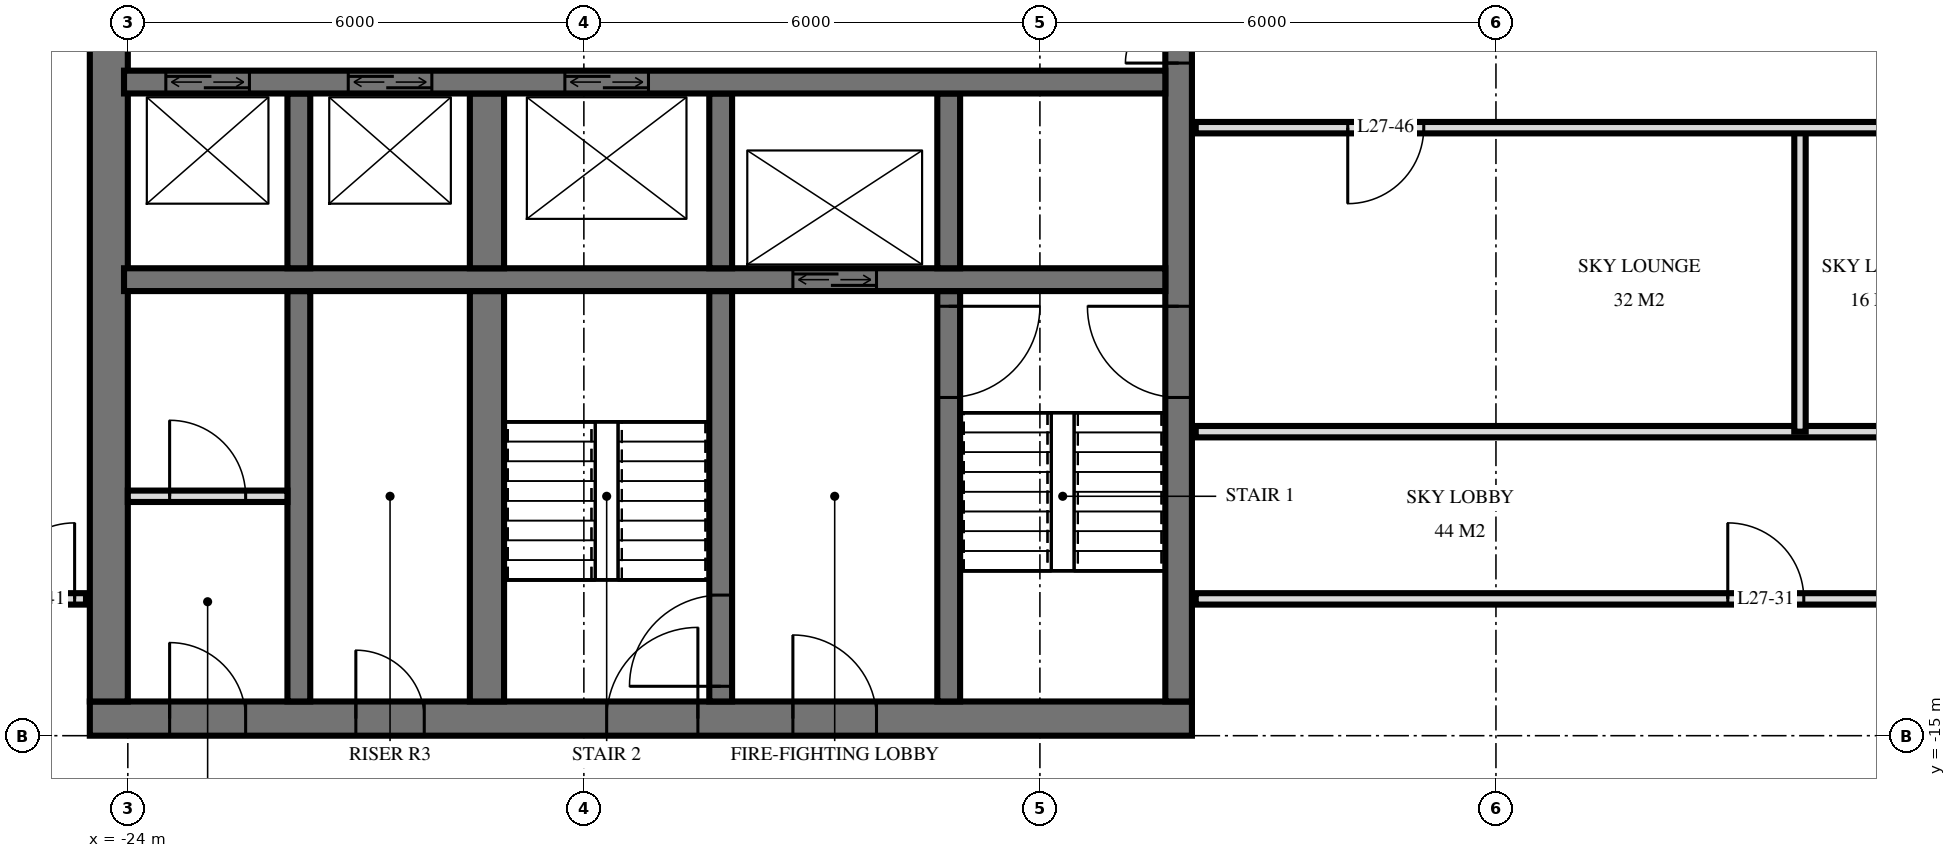
"""IFC4 building model, lengths in metres.
Left out: names, types, materials, properties, quantities, classifications, styles, units other than length and angle.
Written with IfcOpenShell. Run it as: python <this file> out.ifc"""

import sys

from ifc_helpers import new_model, si_unit, direction, frame, frame_2d, origin, place, context, subcontext, project, spatial, rectangle, extrude, element, fill, save


model = new_model("IFC4")
c1 = context("Model", 3, precision=1e-05, world=origin(), true_north=direction((0.0, 1.0)))
c2 = subcontext(c1, "Body", "Model", "MODEL_VIEW")
j1 = project(units=[si_unit("LENGTHUNIT", "METRE"), si_unit("PLANEANGLEUNIT", "RADIAN")], contexts=[c1])
p1 = place(None, origin())
s1 = spatial("IfcSite", under=j1, at=p1, CompositionType="ELEMENT")
p2 = place(p1, origin())
s2 = spatial("IfcBuilding", under=s1, at=p2, CompositionType="ELEMENT")
p3 = place(p2, frame((0.0, 0.0, 106.8)))
s3 = spatial("IfcBuildingStorey", under=s2, at=p3, CompositionType="ELEMENT", Elevation=106.8)
p4 = place(p3, frame((-24.5, -14.775, 0.0), z_axis=(0.0, 0.0, 1.0), x_axis=(1.0, 0.0, 0.0)))
e1 = element("IfcWall", 1, at=p4, inside=s3, PredefinedType="SHEAR", context=c2, shape_type="SweptSolid", body=[
    extrude(rectangle(XDim=14.5, YDim=0.45, at=frame_2d((7.25, 0.0))), origin(), (0.0, 0.0, 1.0), 6.0),
])
p5 = place(p4, frame((6.8, 0.0, 0.0)))
e2 = element("IfcOpeningElement", 2, at=p5, cuts=e1, PredefinedType="OPENING", context=c2, shape_type="SweptSolid", body=[
    extrude(rectangle(XDim=1.2, YDim=2.1, at=frame_2d((0.6, 1.05))), frame((0.0, 0.235, 0.0), z_axis=(0.0, -1.0, 0.0), x_axis=(1.0, 0.0, 0.0)), (0.0, 0.0, 1.0), 0.47),
])
p6 = place(p4, frame((9.25, 0.0, 0.0)))
e3 = element("IfcOpeningElement", 3, at=p6, cuts=e1, PredefinedType="OPENING", context=c2, shape_type="SweptSolid", body=[
    extrude(rectangle(XDim=1.1, YDim=2.1, at=frame_2d((0.55, 1.05))), frame((0.0, 0.235, 0.0), z_axis=(0.0, -1.0, 0.0), x_axis=(1.0, 0.0, 0.0)), (0.0, 0.0, 1.0), 0.47),
])
p7 = place(p4, frame((3.5, 0.0, 0.0)))
e4 = element("IfcOpeningElement", 4, at=p7, cuts=e1, PredefinedType="OPENING", context=c2, shape_type="SweptSolid", body=[
    extrude(rectangle(XDim=0.9, YDim=2.1, at=frame_2d((0.45, 1.05))), frame((0.0, 0.235, 0.0), z_axis=(0.0, -1.0, 0.0), x_axis=(1.0, 0.0, 0.0)), (0.0, 0.0, 1.0), 0.47),
])
p8 = place(p4, frame((1.05, 0.0, 0.0)))
e5 = element("IfcOpeningElement", 5, at=p8, cuts=e1, PredefinedType="OPENING", context=c2, shape_type="SweptSolid", body=[
    extrude(rectangle(XDim=1.0, YDim=2.1, at=frame_2d((0.5, 1.05))), frame((0.0, 0.235, 0.0), z_axis=(0.0, -1.0, 0.0), x_axis=(1.0, 0.0, 0.0)), (0.0, 0.0, 1.0), 0.47),
])
p9 = place(p3, frame((-10.175, -14.55, 0.0), z_axis=(0.0, 0.0, 1.0), x_axis=(0.0, 1.0, 0.0)))
e6 = element("IfcWall", 6, at=p9, inside=s3, PredefinedType="SHEAR", context=c2, shape_type="SweptSolid", body=[
    extrude(rectangle(XDim=14.1, YDim=0.35, at=frame_2d((7.05, 0.0))), origin(), (0.0, 0.0, 1.0), 6.0),
])
p10 = place(p9, frame((8.4, 0.0, 0.0)))
e7 = element("IfcOpeningElement", 7, at=p10, cuts=e6, PredefinedType="OPENING", context=c2, shape_type="SweptSolid", body=[
    extrude(rectangle(XDim=1.4, YDim=2.4, at=frame_2d((0.7, 1.2))), frame((0.0, 0.185, 0.0), z_axis=(0.0, -1.0, 0.0), x_axis=(1.0, 0.0, 0.0)), (0.0, 0.0, 1.0), 0.37),
])
p11 = place(p9, frame((10.0, 0.0, 0.0)))
e8 = element("IfcOpeningElement", 8, at=p11, cuts=e6, PredefinedType="OPENING", context=c2, shape_type="SweptSolid", body=[
    extrude(rectangle(XDim=1.4, YDim=2.4, at=frame_2d((0.7, 1.2))), frame((0.0, 0.185, 0.0), z_axis=(0.0, -1.0, 0.0), x_axis=(1.0, 0.0, 0.0)), (0.0, 0.0, 1.0), 0.37),
])
p12 = place(p9, frame((4.0, 0.0, 0.0)))
e9 = element("IfcOpeningElement", 9, at=p12, cuts=e6, PredefinedType="OPENING", context=c2, shape_type="SweptSolid", body=[
    extrude(rectangle(XDim=1.2, YDim=2.1, at=frame_2d((0.6, 1.05))), frame((0.0, 0.185, 0.0), z_axis=(0.0, -1.0, 0.0), x_axis=(1.0, 0.0, 0.0)), (0.0, 0.0, 1.0), 0.37),
])
p13 = place(p3, frame((-24.25, -14.55, 0.0), z_axis=(0.0, 0.0, 1.0), x_axis=(0.0, 1.0, 0.0)))
e10 = element("IfcWall", 10, at=p13, inside=s3, PredefinedType="SHEAR", context=c2, shape_type="SweptSolid", body=[
    extrude(rectangle(XDim=14.1, YDim=0.5, at=frame_2d((7.05, 0.0))), origin(), (0.0, 0.0, 1.0), 6.0),
])
p14 = place(p3, frame((-24.05, -6.4, 0.0), z_axis=(0.0, 0.0, 1.0), x_axis=(1.0, 0.0, 0.0)))
e11 = element("IfcWall", 11, at=p14, inside=s3, PredefinedType="SHEAR", context=c2, shape_type="SweptSolid", body=[
    extrude(rectangle(XDim=13.7, YDim=0.3, at=frame_2d((6.85, 0.0))), origin(), (0.0, 0.0, 1.0), 6.0),
])
p15 = place(p14, frame((2.95, 0.0, 0.0)))
e12 = element("IfcOpeningElement", 12, at=p15, cuts=e11, PredefinedType="OPENING", context=c2, shape_type="SweptSolid", body=[
    extrude(rectangle(XDim=1.1, YDim=2.1, at=frame_2d((0.55, 1.05))), frame((0.0, 0.16, 0.0), z_axis=(0.0, -1.0, 0.0), x_axis=(1.0, 0.0, 0.0)), (0.0, 0.0, 1.0), 0.32),
])
p16 = place(p14, frame((0.55, 0.0, 0.0)))
e13 = element("IfcOpeningElement", 13, at=p16, cuts=e11, PredefinedType="OPENING", context=c2, shape_type="SweptSolid", body=[
    extrude(rectangle(XDim=1.1, YDim=2.1, at=frame_2d((0.55, 1.05))), frame((0.0, 0.16, 0.0), z_axis=(0.0, -1.0, 0.0), x_axis=(1.0, 0.0, 0.0)), (0.0, 0.0, 1.0), 0.32),
])
p17 = place(p14, frame((5.8, 0.0, 0.0)))
e14 = element("IfcOpeningElement", 14, at=p17, cuts=e11, PredefinedType="OPENING", context=c2, shape_type="SweptSolid", body=[
    extrude(rectangle(XDim=1.1, YDim=2.1, at=frame_2d((0.55, 1.05))), frame((0.0, 0.16, 0.0), z_axis=(0.0, -1.0, 0.0), x_axis=(1.0, 0.0, 0.0)), (0.0, 0.0, 1.0), 0.32),
])
p18 = place(p3, frame((-24.05, -9.0, 0.0), z_axis=(0.0, 0.0, 1.0), x_axis=(1.0, 0.0, 0.0)))
e15 = element("IfcWall", 15, at=p18, inside=s3, PredefinedType="SHEAR", context=c2, shape_type="SweptSolid", body=[
    extrude(rectangle(XDim=13.7, YDim=0.3, at=frame_2d((6.85, 0.0))), origin(), (0.0, 0.0, 1.0), 6.0),
])
p19 = place(p18, frame((8.8, 0.0, 0.0)))
e16 = element("IfcOpeningElement", 16, at=p19, cuts=e15, PredefinedType="OPENING", context=c2, shape_type="SweptSolid", body=[
    extrude(rectangle(XDim=1.1, YDim=2.1, at=frame_2d((0.55, 1.05))), frame((0.0, 0.16, 0.0), z_axis=(0.0, -1.0, 0.0), x_axis=(1.0, 0.0, 0.0)), (0.0, 0.0, 1.0), 0.32),
])
p20 = place(p3, frame((-13.2, -8.85, 0.0), z_axis=(0.0, 0.0, 1.0), x_axis=(0.0, 1.0, 0.0)))
e17 = element("IfcWall", 17, at=p20, inside=s3, PredefinedType="SHEAR", context=c2, shape_type="SweptSolid", body=[
    extrude(rectangle(XDim=2.3, YDim=0.3, at=frame_2d((1.15, 0.0))), origin(), (0.0, 0.0, 1.0), 6.0),
])
p21 = place(p3, frame((-13.2, -14.55, 0.0), z_axis=(0.0, 0.0, 1.0), x_axis=(0.0, 1.0, 0.0)))
e18 = element("IfcWall", 18, at=p21, inside=s3, PredefinedType="SHEAR", context=c2, shape_type="SweptSolid", body=[
    extrude(rectangle(XDim=5.4, YDim=0.3, at=frame_2d((2.7, 0.0))), origin(), (0.0, 0.0, 1.0), 6.0),
])
p22 = place(p21, frame((4.0, 0.0, 0.0)))
e19 = element("IfcOpeningElement", 19, at=p22, cuts=e18, PredefinedType="OPENING", context=c2, shape_type="SweptSolid", body=[
    extrude(rectangle(XDim=1.2, YDim=2.1, at=frame_2d((0.6, 1.05))), frame((0.0, 0.16, 0.0), z_axis=(0.0, -1.0, 0.0), x_axis=(1.0, 0.0, 0.0)), (0.0, 0.0, 1.0), 0.32),
])
p23 = place(p3, frame((-16.2, -8.85, 0.0), z_axis=(0.0, 0.0, 1.0), x_axis=(0.0, 1.0, 0.0)))
e20 = element("IfcWall", 20, at=p23, inside=s3, PredefinedType="SHEAR", context=c2, shape_type="SweptSolid", body=[
    extrude(rectangle(XDim=2.3, YDim=0.3, at=frame_2d((1.15, 0.0))), origin(), (0.0, 0.0, 1.0), 6.0),
])
p24 = place(p3, frame((-16.2, -14.55, 0.0), z_axis=(0.0, 0.0, 1.0), x_axis=(0.0, 1.0, 0.0)))
e21 = element("IfcWall", 21, at=p24, inside=s3, PredefinedType="SHEAR", context=c2, shape_type="SweptSolid", body=[
    extrude(rectangle(XDim=5.4, YDim=0.3, at=frame_2d((2.7, 0.0))), origin(), (0.0, 0.0, 1.0), 6.0),
])
p25 = place(p24, frame((0.2, 0.0, 0.0)))
e22 = element("IfcOpeningElement", 22, at=p25, cuts=e21, PredefinedType="OPENING", context=c2, shape_type="SweptSolid", body=[
    extrude(rectangle(XDim=1.2, YDim=2.1, at=frame_2d((0.6, 1.05))), frame((0.0, 0.16, 0.0), z_axis=(0.0, -1.0, 0.0), x_axis=(1.0, 0.0, 0.0)), (0.0, 0.0, 1.0), 0.32),
])
p26 = place(p3, frame((-19.275, -8.85, 0.0), z_axis=(0.0, 0.0, 1.0), x_axis=(0.0, 1.0, 0.0)))
e23 = element("IfcWall", 23, at=p26, inside=s3, PredefinedType="SHEAR", context=c2, shape_type="SweptSolid", body=[
    extrude(rectangle(XDim=2.3, YDim=0.45, at=frame_2d((1.15, 0.0))), origin(), (0.0, 0.0, 1.0), 6.0),
])
p27 = place(p3, frame((-19.275, -14.55, 0.0), z_axis=(0.0, 0.0, 1.0), x_axis=(0.0, 1.0, 0.0)))
e24 = element("IfcWall", 24, at=p27, inside=s3, PredefinedType="SHEAR", context=c2, shape_type="SweptSolid", body=[
    extrude(rectangle(XDim=5.4, YDim=0.45, at=frame_2d((2.7, 0.0))), origin(), (0.0, 0.0, 1.0), 6.0),
])
p28 = place(p3, frame((-21.75, -8.85, 0.0), z_axis=(0.0, 0.0, 1.0), x_axis=(0.0, 1.0, 0.0)))
e25 = element("IfcWall", 25, at=p28, inside=s3, PredefinedType="SHEAR", context=c2, shape_type="SweptSolid", body=[
    extrude(rectangle(XDim=2.3, YDim=0.3, at=frame_2d((1.15, 0.0))), origin(), (0.0, 0.0, 1.0), 6.0),
])
p29 = place(p3, frame((-21.75, -14.55, 0.0), z_axis=(0.0, 0.0, 1.0), x_axis=(0.0, 1.0, 0.0)))
e26 = element("IfcWall", 26, at=p29, inside=s3, PredefinedType="SHEAR", context=c2, shape_type="SweptSolid", body=[
    extrude(rectangle(XDim=5.4, YDim=0.3, at=frame_2d((2.7, 0.0))), origin(), (0.0, 0.0, 1.0), 6.0),
])
p30 = place(p3, frame((-24.0, -11.85, 0.0), z_axis=(0.0, 0.0, 1.0), x_axis=(1.0, 0.0, 0.0)))
e27 = element("IfcWall", 27, at=p30, inside=s3, PredefinedType="PARTITIONING", context=c2, shape_type="SweptSolid", body=[
    extrude(rectangle(XDim=2.1, YDim=0.15, at=frame_2d((1.05, 0.0))), origin(), (0.0, 0.0, 1.0), 5.7),
])
p31 = place(p30, frame((0.55, 0.0, 0.0)))
e28 = element("IfcOpeningElement", 28, at=p31, cuts=e27, PredefinedType="OPENING", context=c2, shape_type="SweptSolid", body=[
    extrude(rectangle(XDim=1.0, YDim=2.1, at=frame_2d((0.5, 1.05))), frame((0.0, 0.085, 0.0), z_axis=(0.0, -1.0, 0.0), x_axis=(1.0, 0.0, 0.0)), (0.0, 0.0, 1.0), 0.17),
])
p32 = place(p3, frame((-2.0, -11.0, 0.0), z_axis=(0.0, 0.0, 1.0), x_axis=(0.0, 1.0, 0.0)))
e29 = element("IfcWall", 29, at=p32, inside=s3, PredefinedType="PARTITIONING", context=c2, shape_type="SweptSolid", body=[
    extrude(rectangle(XDim=4.0, YDim=0.15, at=frame_2d((2.0, 0.0))), origin(), (0.0, 0.0, 1.0), 5.7),
])
p33 = place(p3, frame((-27.275, -13.2, 0.0), z_axis=(0.0, 0.0, 1.0), x_axis=(1.0, 0.0, 0.0)))
e30 = element("IfcWall", 30, at=p33, inside=s3, PredefinedType="PARTITIONING", context=c2, shape_type="SweptSolid", body=[
    extrude(rectangle(XDim=2.725, YDim=0.15, at=frame_2d((1.362, 0.0))), origin(), (0.0, 0.0, 1.0), 5.7),
])
p34 = place(p33, frame((1.575, 0.0, 0.0)))
e31 = element("IfcOpeningElement", 31, at=p34, cuts=e30, PredefinedType="OPENING", context=c2, shape_type="SweptSolid", body=[
    extrude(rectangle(XDim=1.0, YDim=2.1, at=frame_2d((0.5, 1.05))), frame((0.0, 0.085, 0.0), z_axis=(0.0, -1.0, 0.0), x_axis=(1.0, 0.0, 0.0)), (0.0, 0.0, 1.0), 0.17),
])
p35 = place(p3, frame((-9.95, -13.2, 0.0), z_axis=(0.0, 0.0, 1.0), x_axis=(1.0, 0.0, 0.0)))
e32 = element("IfcWall", 32, at=p35, inside=s3, PredefinedType="PARTITIONING", context=c2, shape_type="SweptSolid", body=[
    extrude(rectangle(XDim=19.9, YDim=0.15, at=frame_2d((9.95, 0.0))), origin(), (0.0, 0.0, 1.0), 5.7),
])
p36 = place(p35, frame((7.0, 0.0, 0.0)))
e33 = element("IfcOpeningElement", 33, at=p36, cuts=e32, PredefinedType="OPENING", context=c2, shape_type="SweptSolid", body=[
    extrude(rectangle(XDim=1.0, YDim=2.1, at=frame_2d((0.5, 1.05))), frame((0.0, 0.085, 0.0), z_axis=(0.0, -1.0, 0.0), x_axis=(1.0, 0.0, 0.0)), (0.0, 0.0, 1.0), 0.17),
])
p37 = place(p3, frame((-9.95, -11.0, 0.0), z_axis=(0.0, 0.0, 1.0), x_axis=(1.0, 0.0, 0.0)))
e34 = element("IfcWall", 34, at=p37, inside=s3, PredefinedType="PARTITIONING", context=c2, shape_type="SweptSolid", body=[
    extrude(rectangle(XDim=19.9, YDim=0.15, at=frame_2d((9.95, 0.0))), origin(), (0.0, 0.0, 1.0), 5.7),
])
p38 = place(p37, frame((9.45, 0.0, 0.0)))
e35 = element("IfcOpeningElement", 35, at=p38, cuts=e34, PredefinedType="OPENING", context=c2, shape_type="SweptSolid", body=[
    extrude(rectangle(XDim=1.0, YDim=2.1, at=frame_2d((0.5, 1.05))), frame((0.0, 0.085, 0.0), z_axis=(0.0, -1.0, 0.0), x_axis=(1.0, 0.0, 0.0)), (0.0, 0.0, 1.0), 0.17),
])
p39 = place(p37, frame((15.45, 0.0, 0.0)))
e36 = element("IfcOpeningElement", 36, at=p39, cuts=e34, PredefinedType="OPENING", context=c2, shape_type="SweptSolid", body=[
    extrude(rectangle(XDim=1.0, YDim=2.1, at=frame_2d((0.5, 1.05))), frame((0.0, 0.085, 0.0), z_axis=(0.0, -1.0, 0.0), x_axis=(1.0, 0.0, 0.0)), (0.0, 0.0, 1.0), 0.17),
])
p40 = place(p3, frame((-9.95, -7.0, 0.0), z_axis=(0.0, 0.0, 1.0), x_axis=(1.0, 0.0, 0.0)))
e37 = element("IfcWall", 37, at=p40, inside=s3, PredefinedType="PARTITIONING", context=c2, shape_type="SweptSolid", body=[
    extrude(rectangle(XDim=19.9, YDim=0.15, at=frame_2d((9.95, 0.0))), origin(), (0.0, 0.0, 1.0), 5.7),
])
p41 = place(p40, frame((9.45, 0.0, 0.0)))
e38 = element("IfcOpeningElement", 38, at=p41, cuts=e37, PredefinedType="OPENING", context=c2, shape_type="SweptSolid", body=[
    extrude(rectangle(XDim=1.0, YDim=2.1, at=frame_2d((0.5, 1.05))), frame((0.0, 0.085, 0.0), z_axis=(0.0, -1.0, 0.0), x_axis=(1.0, 0.0, 0.0)), (0.0, 0.0, 1.0), 0.17),
])
p42 = place(p40, frame((2.0, 0.0, 0.0)))
e39 = element("IfcOpeningElement", 39, at=p42, cuts=e37, PredefinedType="OPENING", context=c2, shape_type="SweptSolid", body=[
    extrude(rectangle(XDim=1.0, YDim=2.1, at=frame_2d((0.5, 1.05))), frame((0.0, 0.085, 0.0), z_axis=(0.0, -1.0, 0.0), x_axis=(1.0, 0.0, 0.0)), (0.0, 0.0, 1.0), 0.17),
])
p43 = place(p15, origin())
e40 = element("IfcDoor", 40, at=p43, inside=s3, OperationType="DOUBLE_DOOR_SLIDING", PredefinedType="USERDEFINED", context=c2, shape_type="SweptSolid", body=[
    extrude(rectangle(XDim=1.1, YDim=2.1, at=frame_2d((0.55, 1.05))), frame((0.0, 0.025, 0.0), z_axis=(0.0, -1.0, 0.0), x_axis=(1.0, 0.0, 0.0)), (0.0, 0.0, 1.0), 0.05),
])
fill(e12, e40)
p44 = place(p16, origin())
e41 = element("IfcDoor", 41, at=p44, inside=s3, OperationType="DOUBLE_DOOR_SLIDING", PredefinedType="USERDEFINED", context=c2, shape_type="SweptSolid", body=[
    extrude(rectangle(XDim=1.1, YDim=2.1, at=frame_2d((0.55, 1.05))), frame((0.0, 0.025, 0.0), z_axis=(0.0, -1.0, 0.0), x_axis=(1.0, 0.0, 0.0)), (0.0, 0.0, 1.0), 0.05),
])
fill(e13, e41)
p45 = place(p19, origin())
e42 = element("IfcDoor", 42, at=p45, inside=s3, OperationType="DOUBLE_DOOR_SLIDING", PredefinedType="USERDEFINED", context=c2, shape_type="SweptSolid", body=[
    extrude(rectangle(XDim=1.1, YDim=2.1, at=frame_2d((0.55, 1.05))), frame((0.0, 0.025, 0.0), z_axis=(0.0, -1.0, 0.0), x_axis=(1.0, 0.0, 0.0)), (0.0, 0.0, 1.0), 0.05),
])
fill(e16, e42)
p46 = place(p17, origin())
e43 = element("IfcDoor", 43, at=p46, inside=s3, OperationType="DOUBLE_DOOR_SLIDING", PredefinedType="USERDEFINED", context=c2, shape_type="SweptSolid", body=[
    extrude(rectangle(XDim=1.1, YDim=2.1, at=frame_2d((0.55, 1.05))), frame((0.0, 0.025, 0.0), z_axis=(0.0, -1.0, 0.0), x_axis=(1.0, 0.0, 0.0)), (0.0, 0.0, 1.0), 0.05),
])
fill(e14, e43)
p47 = place(p10, origin())
e44 = element("IfcDoor", 44, at=p47, inside=s3, OperationType="DOUBLE_DOOR_SINGLE_SWING", PredefinedType="DOOR", context=c2, shape_type="SweptSolid", body=[
    extrude(rectangle(XDim=1.4, YDim=2.4, at=frame_2d((0.7, 1.2))), frame((0.0, 0.025, 0.0), z_axis=(0.0, -1.0, 0.0), x_axis=(1.0, 0.0, 0.0)), (0.0, 0.0, 1.0), 0.05),
])
fill(e7, e44)
p48 = place(p12, origin())
e45 = element("IfcDoor", 45, at=p48, inside=s3, OperationType="SINGLE_SWING_LEFT", PredefinedType="DOOR", context=c2, shape_type="SweptSolid", body=[
    extrude(rectangle(XDim=1.2, YDim=2.1, at=frame_2d((0.6, 1.05))), frame((0.0, 0.025, 0.0), z_axis=(0.0, -1.0, 0.0), x_axis=(1.0, 0.0, 0.0)), (0.0, 0.0, 1.0), 0.05),
])
fill(e9, e45)
p49 = place(p5, origin())
e46 = element("IfcDoor", 46, at=p49, inside=s3, OperationType="SINGLE_SWING_LEFT", PredefinedType="DOOR", context=c2, shape_type="SweptSolid", body=[
    extrude(rectangle(XDim=1.2, YDim=2.1, at=frame_2d((0.6, 1.05))), frame((0.0, 0.025, 0.0), z_axis=(0.0, -1.0, 0.0), x_axis=(1.0, 0.0, 0.0)), (0.0, 0.0, 1.0), 0.05),
])
fill(e2, e46)
p50 = place(p6, origin())
e47 = element("IfcDoor", 47, at=p50, inside=s3, OperationType="SINGLE_SWING_RIGHT", PredefinedType="DOOR", context=c2, shape_type="SweptSolid", body=[
    extrude(rectangle(XDim=1.1, YDim=2.1, at=frame_2d((0.55, 1.05))), frame((0.0, 0.025, 0.0), z_axis=(0.0, -1.0, 0.0), x_axis=(1.0, 0.0, 0.0)), (0.0, 0.0, 1.0), 0.05),
])
fill(e3, e47)
p51 = place(p7, origin())
e48 = element("IfcDoor", 48, at=p51, inside=s3, OperationType="SINGLE_SWING_RIGHT", PredefinedType="DOOR", context=c2, shape_type="SweptSolid", body=[
    extrude(rectangle(XDim=0.9, YDim=2.1, at=frame_2d((0.45, 1.05))), frame((0.0, 0.025, 0.0), z_axis=(0.0, -1.0, 0.0), x_axis=(1.0, 0.0, 0.0)), (0.0, 0.0, 1.0), 0.05),
])
fill(e4, e48)
p52 = place(p8, origin())
e49 = element("IfcDoor", 49, at=p52, inside=s3, OperationType="SINGLE_SWING_RIGHT", PredefinedType="DOOR", context=c2, shape_type="SweptSolid", body=[
    extrude(rectangle(XDim=1.0, YDim=2.1, at=frame_2d((0.5, 1.05))), frame((0.0, 0.025, 0.0), z_axis=(0.0, -1.0, 0.0), x_axis=(1.0, 0.0, 0.0)), (0.0, 0.0, 1.0), 0.05),
])
fill(e5, e49)
p53 = place(p22, frame((0.6, 0.0, 0.0), z_axis=(0.0, 0.0, 1.0), x_axis=(-1.0, 0.0, 0.0)))
e50 = element("IfcDoor", 50, at=p53, inside=s3, OperationType="SINGLE_SWING_RIGHT", PredefinedType="DOOR", context=c2, shape_type="SweptSolid", body=[
    extrude(rectangle(XDim=1.2, YDim=2.1, at=frame_2d((0.0, 1.05))), frame((0.0, -0.025, 0.0), z_axis=(0.0, 1.0, 0.0), x_axis=(-1.0, 0.0, 0.0)), (0.0, 0.0, 1.0), 0.05),
])
fill(e19, e50)
p54 = place(p25, origin())
e51 = element("IfcDoor", 51, at=p54, inside=s3, OperationType="SINGLE_SWING_RIGHT", PredefinedType="DOOR", context=c2, shape_type="SweptSolid", body=[
    extrude(rectangle(XDim=1.2, YDim=2.1, at=frame_2d((0.6, 1.05))), frame((0.0, 0.025, 0.0), z_axis=(0.0, -1.0, 0.0), x_axis=(1.0, 0.0, 0.0)), (0.0, 0.0, 1.0), 0.05),
])
fill(e22, e51)
p55 = place(p31, origin())
e52 = element("IfcDoor", 52, at=p55, inside=s3, OperationType="SINGLE_SWING_RIGHT", PredefinedType="DOOR", context=c2, shape_type="SweptSolid", body=[
    extrude(rectangle(XDim=1.0, YDim=2.1, at=frame_2d((0.5, 1.05))), frame((0.0, 0.025, 0.0), z_axis=(0.0, -1.0, 0.0), x_axis=(1.0, 0.0, 0.0)), (0.0, 0.0, 1.0), 0.05),
])
fill(e28, e52)
p56 = place(p36, origin())
e53 = element("IfcDoor", 53, at=p56, inside=s3, OperationType="SINGLE_SWING_RIGHT", PredefinedType="DOOR", context=c2, shape_type="SweptSolid", body=[
    extrude(rectangle(XDim=1.0, YDim=2.1, at=frame_2d((0.5, 1.05))), frame((0.0, 0.025, 0.0), z_axis=(0.0, -1.0, 0.0), x_axis=(1.0, 0.0, 0.0)), (0.0, 0.0, 1.0), 0.05),
])
fill(e33, e53)
p57 = place(p34, origin())
e54 = element("IfcDoor", 54, at=p57, inside=s3, OperationType="SINGLE_SWING_LEFT", PredefinedType="DOOR", context=c2, shape_type="SweptSolid", body=[
    extrude(rectangle(XDim=1.0, YDim=2.1, at=frame_2d((0.5, 1.05))), frame((0.0, 0.025, 0.0), z_axis=(0.0, -1.0, 0.0), x_axis=(1.0, 0.0, 0.0)), (0.0, 0.0, 1.0), 0.05),
])
fill(e31, e54)
p58 = place(p42, frame((0.5, 0.0, 0.0), z_axis=(0.0, 0.0, 1.0), x_axis=(-1.0, 0.0, 0.0)))
e55 = element("IfcDoor", 55, at=p58, inside=s3, OperationType="SINGLE_SWING_LEFT", PredefinedType="DOOR", context=c2, shape_type="SweptSolid", body=[
    extrude(rectangle(XDim=1.0, YDim=2.1, at=frame_2d((0.0, 1.05))), frame((0.0, -0.025, 0.0), z_axis=(0.0, 1.0, 0.0), x_axis=(-1.0, 0.0, 0.0)), (0.0, 0.0, 1.0), 0.05),
])
fill(e39, e55)
save(model, sys.argv[1])
